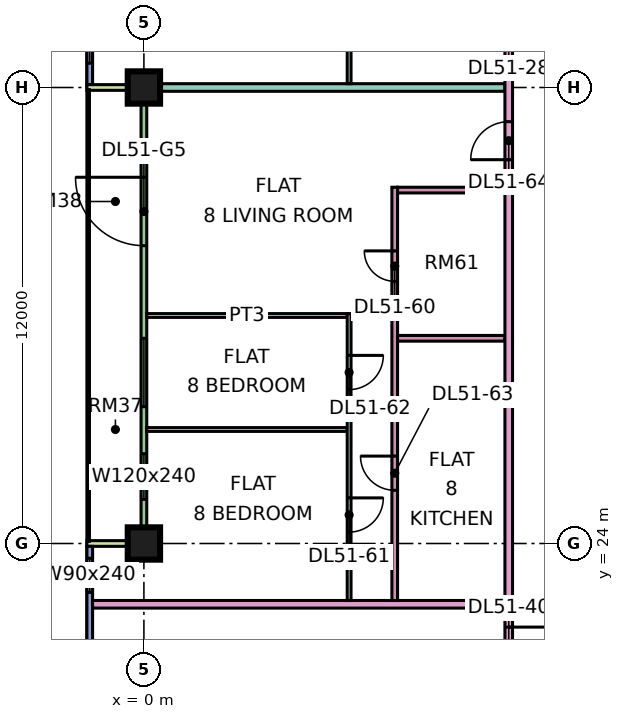
"""IFC4 building model, lengths in metres.
Left out: names, types, materials, properties, quantities, classifications, styles, units other than length and angle.
Written with IfcOpenShell. Run it as: python <this file> out.ifc"""

import sys

from ifc_helpers import new_model, si_unit, direction, frame, frame_2d, origin, origin_2d, place, context, subcontext, project, spatial, rectangle, extrude, element, fill, save


model = new_model("IFC4")
c1 = context("Model", 3, precision=1e-05, world=origin(), true_north=direction((0.0, 1.0)))
c2 = subcontext(c1, "Body", "Model", "MODEL_VIEW")
j1 = project(units=[si_unit("LENGTHUNIT", "METRE"), si_unit("PLANEANGLEUNIT", "RADIAN")], contexts=[c1])
p1 = place(None, origin())
s1 = spatial("IfcSite", under=j1, at=p1, CompositionType="ELEMENT")
p2 = place(p1, origin())
s2 = spatial("IfcBuilding", under=s1, at=p2, CompositionType="ELEMENT")
p3 = place(p2, frame((0.0, 0.0, 219.15)))
s3 = spatial("IfcBuildingStorey", under=s2, at=p3, CompositionType="ELEMENT", Elevation=219.15)
p4 = place(p3, frame((0.0, 24.0, 0.0), z_axis=(0.0, 0.0, 1.0), x_axis=(1.0, 0.0, 0.0)))
e1 = element("IfcColumn", 1, at=p4, inside=s3, PredefinedType="COLUMN", context=c2, shape_type="SweptSolid", body=[
    extrude(rectangle(XDim=0.85, YDim=0.85, at=origin_2d()), origin(), (0.0, 0.0, 1.0), 3.75),
])
p5 = place(p3, frame((0.0, 36.0, 0.0), z_axis=(0.0, 0.0, 1.0), x_axis=(1.0, 0.0, 0.0)))
e2 = element("IfcColumn", 2, at=p5, inside=s3, PredefinedType="COLUMN", context=c2, shape_type="SweptSolid", body=[
    extrude(rectangle(XDim=0.85, YDim=0.85, at=origin_2d()), origin(), (0.0, 0.0, 1.0), 3.75),
])
p6 = place(p3, frame((-1.425, 47.925, 0.0), z_axis=(0.0, 0.0, 1.0), x_axis=(0.0, -1.0, 0.0)))
e3 = element("IfcWall", 3, at=p6, inside=s3, PredefinedType="SOLIDWALL", context=c2, shape_type="SweptSolid", body=[
    extrude(rectangle(XDim=11.85, YDim=0.15, at=frame_2d((5.925, 0.0))), origin(), (0.0, 0.0, 1.0), 3.35),
])
p7 = place(p6, frame((0.562, 0.0, 0.45)))
e4 = element("IfcOpeningElement", 4, at=p7, cuts=e3, PredefinedType="OPENING", context=c2, shape_type="SweptSolid", body=[
    extrude(rectangle(XDim=1.8, YDim=2.4, at=frame_2d((0.9, 1.2))), frame((0.0, 0.085, 0.0), z_axis=(0.0, -1.0, 0.0), x_axis=(1.0, 0.0, 0.0)), (0.0, 0.0, 1.0), 0.17),
])
p8 = place(p6, frame((3.525, 0.0, 0.45)))
e5 = element("IfcOpeningElement", 5, at=p8, cuts=e3, PredefinedType="OPENING", context=c2, shape_type="SweptSolid", body=[
    extrude(rectangle(XDim=1.8, YDim=2.4, at=frame_2d((0.9, 1.2))), frame((0.0, 0.085, 0.0), z_axis=(0.0, -1.0, 0.0), x_axis=(1.0, 0.0, 0.0)), (0.0, 0.0, 1.0), 0.17),
])
p9 = place(p6, frame((6.525, 0.0, 0.45)))
e6 = element("IfcOpeningElement", 6, at=p9, cuts=e3, PredefinedType="OPENING", context=c2, shape_type="SweptSolid", body=[
    extrude(rectangle(XDim=1.8, YDim=2.4, at=frame_2d((0.9, 1.2))), frame((0.0, 0.085, 0.0), z_axis=(0.0, -1.0, 0.0), x_axis=(1.0, 0.0, 0.0)), (0.0, 0.0, 1.0), 0.17),
])
p10 = place(p6, frame((9.488, 0.0, 0.45)))
e7 = element("IfcOpeningElement", 7, at=p10, cuts=e3, PredefinedType="OPENING", context=c2, shape_type="SweptSolid", body=[
    extrude(rectangle(XDim=1.8, YDim=2.4, at=frame_2d((0.9, 1.2))), frame((0.0, 0.085, 0.0), z_axis=(0.0, -1.0, 0.0), x_axis=(1.0, 0.0, 0.0)), (0.0, 0.0, 1.0), 0.17),
])
p11 = place(p3, frame((0.0, 35.925, 0.0), z_axis=(0.0, 0.0, 1.0), x_axis=(0.0, -1.0, 0.0)))
e8 = element("IfcWall", 8, at=p11, inside=s3, PredefinedType="SOLIDWALL", context=c2, shape_type="SweptSolid", body=[
    extrude(rectangle(XDim=11.85, YDim=0.15, at=frame_2d((5.925, 0.0))), origin(), (0.0, 0.0, 1.0), 3.35),
])
p12 = place(p11, frame((2.288, 0.0, 0.0)))
e9 = element("IfcOpeningElement", 9, at=p12, cuts=e8, PredefinedType="OPENING", context=c2, shape_type="SweptSolid", body=[
    extrude(rectangle(XDim=1.8, YDim=2.4, at=frame_2d((0.9, 1.2))), frame((0.0, 0.085, 0.0), z_axis=(0.0, -1.0, 0.0), x_axis=(1.0, 0.0, 0.0)), (0.0, 0.0, 1.0), 0.17),
])
p13 = place(p11, frame((6.525, 0.0, 0.45)))
e10 = element("IfcOpeningElement", 10, at=p13, cuts=e8, PredefinedType="OPENING", context=c2, shape_type="SweptSolid", body=[
    extrude(rectangle(XDim=1.8, YDim=2.4, at=frame_2d((0.9, 1.2))), frame((0.0, 0.085, 0.0), z_axis=(0.0, -1.0, 0.0), x_axis=(1.0, 0.0, 0.0)), (0.0, 0.0, 1.0), 0.17),
])
p14 = place(p11, frame((9.562, 0.0, 0.45)))
e11 = element("IfcOpeningElement", 11, at=p14, cuts=e8, PredefinedType="OPENING", context=c2, shape_type="SweptSolid", body=[
    extrude(rectangle(XDim=1.2, YDim=2.4, at=frame_2d((0.6, 1.2))), frame((0.0, 0.085, 0.0), z_axis=(0.0, -1.0, 0.0), x_axis=(1.0, 0.0, 0.0)), (0.0, 0.0, 1.0), 0.17),
])
for number, where, z_axis, x_axis in (
    (12, (-1.5, 36.0, 0.0), (0.0, 0.0, 1.0), (1.0, 0.0, 0.0)),
    (13, (-1.5, 24.0, 0.0), (0.0, 0.0, 1.0), (1.0, 0.0, 0.0)),
):
    element("IfcWall", number, at=place(p3, frame(where, z_axis=z_axis, x_axis=x_axis)), inside=s3, PredefinedType="SOLIDWALL", context=c2, shape_type="SweptSolid", body=[
        extrude(rectangle(XDim=1.5, YDim=0.15, at=frame_2d((0.75, 0.0))), origin(), (0.0, 0.0, 1.0), 3.35),
    ])
p15 = place(p3, frame((-1.425, 23.925, 0.0), z_axis=(0.0, 0.0, 1.0), x_axis=(0.0, -1.0, 0.0)))
e14 = element("IfcWall", 14, at=p15, inside=s3, PredefinedType="SOLIDWALL", context=c2, shape_type="SweptSolid", body=[
    extrude(rectangle(XDim=11.425, YDim=0.15, at=frame_2d((5.712, 0.0))), origin(), (0.0, 0.0, 1.0), 3.35),
])
p16 = place(p15, frame((0.312, 0.0, 0.45)))
e15 = element("IfcOpeningElement", 15, at=p16, cuts=e14, PredefinedType="OPENING", context=c2, shape_type="SweptSolid", body=[
    extrude(rectangle(XDim=0.9, YDim=2.4, at=frame_2d((0.45, 1.2))), frame((0.0, 0.085, 0.0), z_axis=(0.0, -1.0, 0.0), x_axis=(1.0, 0.0, 0.0)), (0.0, 0.0, 1.0), 0.17),
])
p17 = place(p15, frame((6.175, 0.0, 0.45)))
e16 = element("IfcOpeningElement", 16, at=p17, cuts=e14, PredefinedType="OPENING", context=c2, shape_type="SweptSolid", body=[
    extrude(rectangle(XDim=3.0, YDim=2.4, at=frame_2d((1.5, 1.2))), frame((0.0, 0.085, 0.0), z_axis=(0.0, -1.0, 0.0), x_axis=(1.0, 0.0, 0.0)), (0.0, 0.0, 1.0), 0.17),
])
p18 = place(p3, frame((-1.35, 22.4, 0.0), z_axis=(0.0, 0.0, 1.0), x_axis=(1.0, 0.0, 0.0)))
e17 = element("IfcWall", 17, at=p18, inside=s3, PredefinedType="PARTITIONING", context=c2, shape_type="SweptSolid", body=[
    extrude(rectangle(XDim=10.85, YDim=0.2, at=frame_2d((5.425, 0.0))), origin(), (0.0, 0.0, 1.0), 3.35),
])
e18 = element("IfcWall", 18, at=p5, inside=s3, PredefinedType="PARTITIONING", context=c2, shape_type="SweptSolid", body=[
    extrude(rectangle(XDim=9.5, YDim=0.2, at=frame_2d((4.75, 0.0))), origin(), (0.0, 0.0, 1.0), 3.35),
])
for number, where, z_axis, x_axis in (
    (19, (0.074, 27.0, 0.0), (0.0, 0.0, 1.0), (1.0, 0.0, 0.0)),
    (20, (0.074, 30.0, 0.0), (0.0, 0.0, 1.0), (1.0, 0.0, 0.0)),
):
    element("IfcWall", number, at=place(p3, frame(where, z_axis=z_axis, x_axis=x_axis)), inside=s3, PredefinedType="PARTITIONING", context=c2, shape_type="SweptSolid", body=[
        extrude(rectangle(XDim=5.276, YDim=0.1, at=frame_2d((2.638, 0.0))), origin(), (0.0, 0.0, 1.0), 3.35),
    ])
p19 = place(p3, frame((5.4, 22.5, 0.0), z_axis=(0.0, 0.0, 1.0), x_axis=(0.0, 1.0, 0.0)))
e21 = element("IfcWall", 21, at=p19, inside=s3, PredefinedType="PARTITIONING", context=c2, shape_type="SweptSolid", body=[
    extrude(rectangle(XDim=7.55, YDim=0.1, at=frame_2d((3.775, 0.0))), origin(), (0.0, 0.0, 1.0), 3.35),
])
p20 = place(p19, frame((1.8, 0.0, 0.0)))
e22 = element("IfcOpeningElement", 22, at=p20, cuts=e21, PredefinedType="OPENING", context=c2, shape_type="SweptSolid", body=[
    extrude(rectangle(XDim=0.9, YDim=2.1, at=frame_2d((0.45, 1.05))), frame((0.0, 0.06, 0.0), z_axis=(0.0, -1.0, 0.0), x_axis=(1.0, 0.0, 0.0)), (0.0, 0.0, 1.0), 0.12),
])
p21 = place(p19, frame((5.55, 0.0, 0.0)))
e23 = element("IfcOpeningElement", 23, at=p21, cuts=e21, PredefinedType="OPENING", context=c2, shape_type="SweptSolid", body=[
    extrude(rectangle(XDim=0.9, YDim=2.1, at=frame_2d((0.45, 1.05))), frame((0.0, 0.06, 0.0), z_axis=(0.0, -1.0, 0.0), x_axis=(1.0, 0.0, 0.0)), (0.0, 0.0, 1.0), 0.12),
])
p22 = place(p3, frame((5.4, 36.1, 0.0), z_axis=(0.0, 0.0, 1.0), x_axis=(0.0, 1.0, 0.0)))
e24 = element("IfcWall", 24, at=p22, inside=s3, PredefinedType="PARTITIONING", context=c2, shape_type="SweptSolid", body=[
    extrude(rectangle(XDim=8.95, YDim=0.1, at=frame_2d((4.475, 0.0))), origin(), (0.0, 0.0, 1.0), 3.35),
])
p23 = place(p22, frame((0.95, 0.0, 0.0)))
e25 = element("IfcOpeningElement", 25, at=p23, cuts=e24, PredefinedType="OPENING", context=c2, shape_type="SweptSolid", body=[
    extrude(rectangle(XDim=0.9, YDim=2.1, at=frame_2d((0.45, 1.05))), frame((0.0, 0.06, 0.0), z_axis=(0.0, -1.0, 0.0), x_axis=(1.0, 0.0, 0.0)), (0.0, 0.0, 1.0), 0.12),
])
p24 = place(p22, frame((3.95, 0.0, 0.0)))
e26 = element("IfcOpeningElement", 26, at=p24, cuts=e24, PredefinedType="OPENING", context=c2, shape_type="SweptSolid", body=[
    extrude(rectangle(XDim=0.9, YDim=2.1, at=frame_2d((0.45, 1.05))), frame((0.0, 0.06, 0.0), z_axis=(0.0, -1.0, 0.0), x_axis=(1.0, 0.0, 0.0)), (0.0, 0.0, 1.0), 0.12),
])
p25 = place(p22, frame((6.95, 0.0, 0.0)))
e27 = element("IfcOpeningElement", 27, at=p25, cuts=e24, PredefinedType="OPENING", context=c2, shape_type="SweptSolid", body=[
    extrude(rectangle(XDim=0.9, YDim=2.1, at=frame_2d((0.45, 1.05))), frame((0.0, 0.06, 0.0), z_axis=(0.0, -1.0, 0.0), x_axis=(1.0, 0.0, 0.0)), (0.0, 0.0, 1.0), 0.12),
])
p26 = place(p3, frame((6.6, 22.5, 0.0), z_axis=(0.0, 0.0, 1.0), x_axis=(0.0, 1.0, 0.0)))
e28 = element("IfcWall", 28, at=p26, inside=s3, PredefinedType="PARTITIONING", context=c2, shape_type="SweptSolid", body=[
    extrude(rectangle(XDim=10.875, YDim=0.15, at=frame_2d((5.438, 0.0))), origin(), (0.0, 0.0, 1.0), 3.35),
])
p27 = place(p26, frame((8.4, 0.0, 0.0)))
e29 = element("IfcOpeningElement", 29, at=p27, cuts=e28, PredefinedType="OPENING", context=c2, shape_type="SweptSolid", body=[
    extrude(rectangle(XDim=0.8, YDim=2.1, at=frame_2d((0.4, 1.05))), frame((0.0, 0.085, 0.0), z_axis=(0.0, -1.0, 0.0), x_axis=(1.0, 0.0, 0.0)), (0.0, 0.0, 1.0), 0.17),
])
p28 = place(p26, frame((2.9, 0.0, 0.0)))
e30 = element("IfcOpeningElement", 30, at=p28, cuts=e28, PredefinedType="OPENING", context=c2, shape_type="SweptSolid", body=[
    extrude(rectangle(XDim=0.9, YDim=2.1, at=frame_2d((0.45, 1.05))), frame((0.0, 0.085, 0.0), z_axis=(0.0, -1.0, 0.0), x_axis=(1.0, 0.0, 0.0)), (0.0, 0.0, 1.0), 0.17),
])
for number, where, z_axis, x_axis in (
    (31, (6.675, 29.4, 0.0), (0.0, 0.0, 1.0), (1.0, 0.0, 0.0)),
    (32, (6.675, 33.3, 0.0), (0.0, 0.0, 1.0), (1.0, 0.0, 0.0)),
):
    element("IfcWall", number, at=place(p3, frame(where, z_axis=z_axis, x_axis=x_axis)), inside=s3, PredefinedType="PARTITIONING", context=c2, shape_type="SweptSolid", body=[
        extrude(rectangle(XDim=2.825, YDim=0.15, at=frame_2d((1.413, 0.0))), origin(), (0.0, 0.0, 1.0), 3.35),
    ])
p29 = place(p3, frame((9.6, 20.0, 0.0), z_axis=(0.0, 0.0, 1.0), x_axis=(0.0, 1.0, 0.0)))
e33 = element("IfcWall", 33, at=p29, inside=s3, PredefinedType="PARTITIONING", context=c2, shape_type="SweptSolid", body=[
    extrude(rectangle(XDim=42.926, YDim=0.2, at=frame_2d((21.463, 0.0))), origin(), (0.0, 0.0, 1.0), 3.35),
])
p30 = place(p29, frame((17.1, 0.0, 0.0)))
e34 = element("IfcOpeningElement", 34, at=p30, cuts=e33, PredefinedType="OPENING", context=c2, shape_type="SweptSolid", body=[
    extrude(rectangle(XDim=1.0, YDim=2.1, at=frame_2d((0.5, 1.05))), frame((0.0, 0.11, 0.0), z_axis=(0.0, -1.0, 0.0), x_axis=(1.0, 0.0, 0.0)), (0.0, 0.0, 1.0), 0.22),
])
p31 = place(p29, frame((32.1, 0.0, 0.0)))
e35 = element("IfcOpeningElement", 35, at=p31, cuts=e33, PredefinedType="OPENING", context=c2, shape_type="SweptSolid", body=[
    extrude(rectangle(XDim=1.0, YDim=2.1, at=frame_2d((0.5, 1.05))), frame((0.0, 0.11, 0.0), z_axis=(0.0, -1.0, 0.0), x_axis=(1.0, 0.0, 0.0)), (0.0, 0.0, 1.0), 0.22),
])
p32 = place(p29, frame((0.6, 0.0, 0.0)))
e36 = element("IfcOpeningElement", 36, at=p32, cuts=e33, PredefinedType="OPENING", context=c2, shape_type="SweptSolid", body=[
    extrude(rectangle(XDim=1.2, YDim=2.1, at=frame_2d((0.6, 1.05))), frame((0.0, 0.11, 0.0), z_axis=(0.0, -1.0, 0.0), x_axis=(1.0, 0.0, 0.0)), (0.0, 0.0, 1.0), 0.22),
])
p33 = place(p29, frame((14.1, 0.0, 0.0)))
e37 = element("IfcOpeningElement", 37, at=p33, cuts=e33, PredefinedType="OPENING", context=c2, shape_type="SweptSolid", body=[
    extrude(rectangle(XDim=1.0, YDim=2.1, at=frame_2d((0.5, 1.05))), frame((0.0, 0.11, 0.0), z_axis=(0.0, -1.0, 0.0), x_axis=(1.0, 0.0, 0.0)), (0.0, 0.0, 1.0), 0.22),
])
p34 = place(p10, origin())
e38 = element("IfcWindow", 38, at=p34, inside=s3, PartitioningType="SINGLE_PANEL", PredefinedType="WINDOW", context=c2, shape_type="SweptSolid", body=[
    extrude(rectangle(XDim=1.8, YDim=2.4, at=frame_2d((0.9, 1.2))), frame((0.0, 0.03, 0.0), z_axis=(0.0, -1.0, 0.0), x_axis=(1.0, 0.0, 0.0)), (0.0, 0.0, 1.0), 0.06),
])
fill(e7, e38)
p35 = place(p12, frame((1.8, 0.0, 0.0), z_axis=(0.0, 0.0, 1.0), x_axis=(-1.0, 0.0, 0.0)))
e39 = element("IfcDoor", 39, at=p35, inside=s3, OperationType="DOUBLE_DOOR_SINGLE_SWING", PredefinedType="DOOR", context=c2, shape_type="SweptSolid", body=[
    extrude(rectangle(XDim=1.8, YDim=2.4, at=frame_2d((0.9, 1.2))), frame((0.0, 0.025, 0.0), z_axis=(0.0, -1.0, 0.0), x_axis=(1.0, 0.0, 0.0)), (0.0, 0.0, 1.0), 0.05),
])
fill(e9, e39)
p36 = place(p13, origin())
e40 = element("IfcWindow", 40, at=p36, inside=s3, PartitioningType="SINGLE_PANEL", PredefinedType="WINDOW", context=c2, shape_type="SweptSolid", body=[
    extrude(rectangle(XDim=1.8, YDim=2.4, at=frame_2d((0.9, 1.2))), frame((0.0, 0.03, 0.0), z_axis=(0.0, -1.0, 0.0), x_axis=(1.0, 0.0, 0.0)), (0.0, 0.0, 1.0), 0.06),
])
fill(e10, e40)
p37 = place(p14, origin())
e41 = element("IfcWindow", 41, at=p37, inside=s3, PartitioningType="SINGLE_PANEL", PredefinedType="WINDOW", context=c2, shape_type="SweptSolid", body=[
    extrude(rectangle(XDim=1.2, YDim=2.4, at=frame_2d((0.6, 1.2))), frame((0.0, 0.03, 0.0), z_axis=(0.0, -1.0, 0.0), x_axis=(1.0, 0.0, 0.0)), (0.0, 0.0, 1.0), 0.06),
])
fill(e11, e41)
p38 = place(p16, origin())
e42 = element("IfcWindow", 42, at=p38, inside=s3, PartitioningType="SINGLE_PANEL", PredefinedType="WINDOW", context=c2, shape_type="SweptSolid", body=[
    extrude(rectangle(XDim=0.9, YDim=2.4, at=frame_2d((0.45, 1.2))), frame((0.0, 0.03, 0.0), z_axis=(0.0, -1.0, 0.0), x_axis=(1.0, 0.0, 0.0)), (0.0, 0.0, 1.0), 0.06),
])
fill(e15, e42)
p39 = place(p32, origin())
e43 = element("IfcDoor", 43, at=p39, inside=s3, OperationType="SINGLE_SWING_RIGHT", PredefinedType="DOOR", context=c2, shape_type="SweptSolid", body=[
    extrude(rectangle(XDim=1.2, YDim=2.1, at=frame_2d((0.6, 1.05))), frame((0.0, 0.025, 0.0), z_axis=(0.0, -1.0, 0.0), x_axis=(1.0, 0.0, 0.0)), (0.0, 0.0, 1.0), 0.05),
])
fill(e36, e43)
p40 = place(p27, frame((0.8, 0.0, 0.0), z_axis=(0.0, 0.0, 1.0), x_axis=(-1.0, 0.0, 0.0)))
e44 = element("IfcDoor", 44, at=p40, inside=s3, OperationType="SINGLE_SWING_RIGHT", PredefinedType="DOOR", context=c2, shape_type="SweptSolid", body=[
    extrude(rectangle(XDim=0.8, YDim=2.1, at=frame_2d((0.4, 1.05))), frame((0.0, 0.025, 0.0), z_axis=(0.0, -1.0, 0.0), x_axis=(1.0, 0.0, 0.0)), (0.0, 0.0, 1.0), 0.05),
])
fill(e29, e44)
p41 = place(p20, origin())
e45 = element("IfcDoor", 45, at=p41, inside=s3, OperationType="SINGLE_SWING_RIGHT", PredefinedType="DOOR", context=c2, shape_type="SweptSolid", body=[
    extrude(rectangle(XDim=0.9, YDim=2.1, at=frame_2d((0.45, 1.05))), frame((0.0, 0.025, 0.0), z_axis=(0.0, -1.0, 0.0), x_axis=(1.0, 0.0, 0.0)), (0.0, 0.0, 1.0), 0.05),
])
fill(e22, e45)
p42 = place(p21, origin())
e46 = element("IfcDoor", 46, at=p42, inside=s3, OperationType="SINGLE_SWING_RIGHT", PredefinedType="DOOR", context=c2, shape_type="SweptSolid", body=[
    extrude(rectangle(XDim=0.9, YDim=2.1, at=frame_2d((0.45, 1.05))), frame((0.0, 0.025, 0.0), z_axis=(0.0, -1.0, 0.0), x_axis=(1.0, 0.0, 0.0)), (0.0, 0.0, 1.0), 0.05),
])
fill(e23, e46)
p43 = place(p28, frame((0.9, 0.0, 0.0), z_axis=(0.0, 0.0, 1.0), x_axis=(-1.0, 0.0, 0.0)))
e47 = element("IfcDoor", 47, at=p43, inside=s3, OperationType="SINGLE_SWING_RIGHT", PredefinedType="DOOR", context=c2, shape_type="SweptSolid", body=[
    extrude(rectangle(XDim=0.9, YDim=2.1, at=frame_2d((0.45, 1.05))), frame((0.0, 0.025, 0.0), z_axis=(0.0, -1.0, 0.0), x_axis=(1.0, 0.0, 0.0)), (0.0, 0.0, 1.0), 0.05),
])
fill(e30, e47)
p44 = place(p33, origin())
e48 = element("IfcDoor", 48, at=p44, inside=s3, OperationType="SINGLE_SWING_LEFT", PredefinedType="DOOR", context=c2, shape_type="SweptSolid", body=[
    extrude(rectangle(XDim=1.0, YDim=2.1, at=frame_2d((0.5, 1.05))), frame((0.0, 0.025, 0.0), z_axis=(0.0, -1.0, 0.0), x_axis=(1.0, 0.0, 0.0)), (0.0, 0.0, 1.0), 0.05),
])
fill(e37, e48)
save(model, sys.argv[1])
